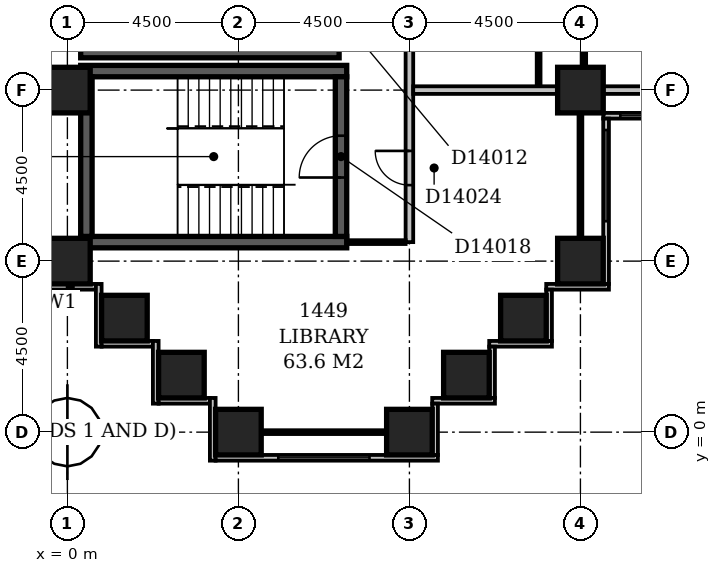
"""IFC4 building model, lengths in metres.
Left out: names, types, materials, properties, quantities, classifications, styles, units other than length and angle.
Written with IfcOpenShell. Run it as: python <this file> out.ifc"""

import sys

from ifc_helpers import new_model, si_unit, direction, frame, frame_2d, origin, origin_2d, place, context, subcontext, project, spatial, rectangle, extrude, element, fill, save


model = new_model("IFC4")
c1 = context("Model", 3, precision=1e-05, world=origin(), true_north=direction((0.0, 1.0)))
c2 = subcontext(c1, "Body", "Model", "MODEL_VIEW")
j1 = project(units=[si_unit("LENGTHUNIT", "METRE"), si_unit("PLANEANGLEUNIT", "RADIAN")], contexts=[c1])
p1 = place(None, origin())
s1 = spatial("IfcSite", under=j1, at=p1, CompositionType="ELEMENT")
p2 = place(p1, origin())
s2 = spatial("IfcBuilding", under=s1, at=p2, CompositionType="ELEMENT")
p3 = place(p2, frame((0.0, 0.0, 61.4)))
s3 = spatial("IfcBuildingStorey", under=s2, at=p3, CompositionType="ELEMENT", Elevation=61.4)
for number, where, z_axis, x_axis in (
    (1, (0.35, 5.0, -0.3), (0.0, 0.0, 1.0), (1.0, 0.0, 0.0)),
    (2, (0.35, 9.5, -0.3), (0.0, 0.0, 1.0), (1.0, 0.0, 0.0)),
):
    element("IfcWall", number, at=place(p3, frame(where, z_axis=z_axis, x_axis=x_axis)), inside=s3, PredefinedType="SHEAR", context=c2, shape_type="SweptSolid", body=[
        extrude(rectangle(XDim=7.0, YDim=0.3, at=frame_2d((3.5, 0.0))), origin(), (0.0, 0.0, 1.0), 3.6),
    ])
p4 = place(p3, frame((0.35, 10.0, -0.3), z_axis=(0.0, 0.0, 1.0), x_axis=(1.0, 0.0, 0.0)))
e3 = element("IfcWall", 3, at=p4, inside=s3, PredefinedType="SHEAR", context=c2, shape_type="SweptSolid", body=[
    extrude(rectangle(XDim=6.8, YDim=0.3, at=frame_2d((3.4, 0.0))), origin(), (0.0, 0.0, 1.0), 3.6),
])
p5 = place(p3, frame((0.5, 5.15, -0.3), z_axis=(0.0, 0.0, 1.0), x_axis=(0.0, 1.0, 0.0)))
e4 = element("IfcWall", 4, at=p5, inside=s3, PredefinedType="SHEAR", context=c2, shape_type="SweptSolid", body=[
    extrude(rectangle(XDim=4.2, YDim=0.3, at=frame_2d((2.1, 0.0))), origin(), (0.0, 0.0, 1.0), 3.6),
])
p6 = place(p3, frame((7.2, 5.15, -0.3), z_axis=(0.0, 0.0, 1.0), x_axis=(0.0, 1.0, 0.0)))
e5 = element("IfcWall", 5, at=p6, inside=s3, PredefinedType="SHEAR", context=c2, shape_type="SweptSolid", body=[
    extrude(rectangle(XDim=4.2, YDim=0.3, at=frame_2d((2.1, 0.0))), origin(), (0.0, 0.0, 1.0), 3.6),
])
p7 = place(p6, frame((1.55, 0.0, 0.3)))
e6 = element("IfcOpeningElement", 6, at=p7, cuts=e5, PredefinedType="OPENING", context=c2, shape_type="SweptSolid", body=[
    extrude(rectangle(XDim=1.1, YDim=2.1, at=frame_2d((0.55, 1.05))), frame((0.0, 0.162, 0.0), z_axis=(0.0, -1.0, 0.0), x_axis=(1.0, 0.0, 0.0)), (0.0, 0.0, 1.0), 0.324),
])
for number, where, z_axis, x_axis in (
    (7, (4.5, 0.0, -0.3), (0.0, 0.0, 1.0), (1.0, 0.0, 0.0)),
    (8, (9.0, 0.0, -0.3), (0.0, 0.0, 1.0), (1.0, 0.0, 0.0)),
    (9, (3.0, 1.5, -0.3), (0.0, 0.0, 1.0), (1.0, 0.0, 0.0)),
    (10, (10.5, 1.5, -0.3), (0.0, 0.0, 1.0), (1.0, 0.0, 0.0)),
    (11, (1.5, 3.0, -0.3), (0.0, 0.0, 1.0), (1.0, 0.0, 0.0)),
    (12, (12.0, 3.0, -0.3), (0.0, 0.0, 1.0), (1.0, 0.0, 0.0)),
    (13, (0.0, 4.5, -0.3), (0.0, 0.0, 1.0), (1.0, 0.0, 0.0)),
    (14, (13.5, 4.5, -0.3), (0.0, 0.0, 1.0), (1.0, 0.0, 0.0)),
    (15, (0.0, 9.0, -0.3), (0.0, 0.0, 1.0), (1.0, 0.0, 0.0)),
    (16, (13.5, 9.0, -0.3), (0.0, 0.0, 1.0), (1.0, 0.0, 0.0)),
):
    element("IfcColumn", number, at=place(p3, frame(where, z_axis=z_axis, x_axis=x_axis)), inside=s3, PredefinedType="COLUMN", context=c2, shape_type="SweptSolid", body=[
        extrude(rectangle(XDim=1.2, YDim=1.2, at=origin_2d()), origin(), (0.0, 0.0, 1.0), 3.6),
    ])
p8 = place(p3, frame((9.675, -0.6, 0.0), z_axis=(0.0, 0.0, 1.0), x_axis=(0.0, 1.0, 0.0)))
e17 = element("IfcWall", 17, at=p8, inside=s3, PredefinedType="STANDARD", context=c2, shape_type="SweptSolid", body=[
    extrude(rectangle(XDim=1.35, YDim=0.15, at=frame_2d((0.675, 0.0))), origin(), (0.0, 0.0, 1.0), 2.7),
])
p9 = place(p3, frame((9.6, 0.825, 0.0), z_axis=(0.0, 0.0, 1.0), x_axis=(1.0, 0.0, 0.0)))
e18 = element("IfcWall", 18, at=p9, inside=s3, PredefinedType="STANDARD", context=c2, shape_type="SweptSolid", body=[
    extrude(rectangle(XDim=1.65, YDim=0.15, at=frame_2d((0.825, 0.0))), origin(), (0.0, 0.0, 1.0), 2.7),
])
p10 = place(p3, frame((11.175, 0.9, 0.0), z_axis=(0.0, 0.0, 1.0), x_axis=(0.0, 1.0, 0.0)))
e19 = element("IfcWall", 19, at=p10, inside=s3, PredefinedType="STANDARD", context=c2, shape_type="SweptSolid", body=[
    extrude(rectangle(XDim=1.35, YDim=0.15, at=frame_2d((0.675, 0.0))), origin(), (0.0, 0.0, 1.0), 2.7),
])
p11 = place(p3, frame((11.1, 2.325, 0.0), z_axis=(0.0, 0.0, 1.0), x_axis=(1.0, 0.0, 0.0)))
e20 = element("IfcWall", 20, at=p11, inside=s3, PredefinedType="STANDARD", context=c2, shape_type="SweptSolid", body=[
    extrude(rectangle(XDim=1.65, YDim=0.15, at=frame_2d((0.825, 0.0))), origin(), (0.0, 0.0, 1.0), 2.7),
])
p12 = place(p3, frame((12.675, 2.4, 0.0), z_axis=(0.0, 0.0, 1.0), x_axis=(0.0, 1.0, 0.0)))
e21 = element("IfcWall", 21, at=p12, inside=s3, PredefinedType="STANDARD", context=c2, shape_type="SweptSolid", body=[
    extrude(rectangle(XDim=1.35, YDim=0.15, at=frame_2d((0.675, 0.0))), origin(), (0.0, 0.0, 1.0), 2.7),
])
p13 = place(p3, frame((12.6, 3.825, 0.0), z_axis=(0.0, 0.0, 1.0), x_axis=(1.0, 0.0, 0.0)))
e22 = element("IfcWall", 22, at=p13, inside=s3, PredefinedType="STANDARD", context=c2, shape_type="SweptSolid", body=[
    extrude(rectangle(XDim=1.65, YDim=0.15, at=frame_2d((0.825, 0.0))), origin(), (0.0, 0.0, 1.0), 2.7),
])
p14 = place(p3, frame((14.175, 3.9, 0.0), z_axis=(0.0, 0.0, 1.0), x_axis=(0.0, 1.0, 0.0)))
e23 = element("IfcWall", 23, at=p14, inside=s3, PredefinedType="STANDARD", context=c2, shape_type="SweptSolid", body=[
    extrude(rectangle(XDim=4.35, YDim=0.15, at=frame_2d((2.175, 0.0))), origin(), (0.0, 0.0, 1.0), 2.7),
])
p15 = place(p14, frame((1.65, 0.0, 0.6)))
e24 = element("IfcOpeningElement", 24, at=p15, cuts=e23, PredefinedType="OPENING", context=c2, shape_type="SweptSolid", body=[
    extrude(rectangle(XDim=2.4, YDim=1.8, at=frame_2d((1.2, 0.9))), frame((0.0, 0.087, 0.0), z_axis=(0.0, -1.0, 0.0), x_axis=(1.0, 0.0, 0.0)), (0.0, 0.0, 1.0), 0.174),
])
p16 = place(p3, frame((14.1, 8.325, 0.0), z_axis=(0.0, 0.0, 1.0), x_axis=(1.0, 0.0, 0.0)))
e25 = element("IfcWall", 25, at=p16, inside=s3, PredefinedType="STANDARD", context=c2, shape_type="SweptSolid", body=[
    extrude(rectangle(XDim=4.65, YDim=0.15, at=frame_2d((2.325, 0.0))), origin(), (0.0, 0.0, 1.0), 2.7),
])
p17 = place(p16, frame((0.45, 0.0, 0.6)))
e26 = element("IfcOpeningElement", 26, at=p17, cuts=e25, PredefinedType="OPENING", context=c2, shape_type="SweptSolid", body=[
    extrude(rectangle(XDim=2.4, YDim=1.8, at=frame_2d((1.2, 0.9))), frame((0.0, 0.087, 0.0), z_axis=(0.0, -1.0, 0.0), x_axis=(1.0, 0.0, 0.0)), (0.0, 0.0, 1.0), 0.174),
])
p18 = place(p3, frame((-0.6, 3.825, 0.0), z_axis=(0.0, 0.0, 1.0), x_axis=(1.0, 0.0, 0.0)))
e27 = element("IfcWall", 27, at=p18, inside=s3, PredefinedType="STANDARD", context=c2, shape_type="SweptSolid", body=[
    extrude(rectangle(XDim=1.35, YDim=0.15, at=frame_2d((0.675, 0.0))), origin(), (0.0, 0.0, 1.0), 2.7),
])
p19 = place(p3, frame((0.825, 3.9, 0.0), z_axis=(0.0, 0.0, 1.0), x_axis=(0.0, -1.0, 0.0)))
e28 = element("IfcWall", 28, at=p19, inside=s3, PredefinedType="STANDARD", context=c2, shape_type="SweptSolid", body=[
    extrude(rectangle(XDim=1.65, YDim=0.15, at=frame_2d((0.825, 0.0))), origin(), (0.0, 0.0, 1.0), 2.7),
])
p20 = place(p3, frame((0.9, 2.325, 0.0), z_axis=(0.0, 0.0, 1.0), x_axis=(1.0, 0.0, 0.0)))
e29 = element("IfcWall", 29, at=p20, inside=s3, PredefinedType="STANDARD", context=c2, shape_type="SweptSolid", body=[
    extrude(rectangle(XDim=1.35, YDim=0.15, at=frame_2d((0.675, 0.0))), origin(), (0.0, 0.0, 1.0), 2.7),
])
p21 = place(p3, frame((2.325, 2.4, 0.0), z_axis=(0.0, 0.0, 1.0), x_axis=(0.0, -1.0, 0.0)))
e30 = element("IfcWall", 30, at=p21, inside=s3, PredefinedType="STANDARD", context=c2, shape_type="SweptSolid", body=[
    extrude(rectangle(XDim=1.65, YDim=0.15, at=frame_2d((0.825, 0.0))), origin(), (0.0, 0.0, 1.0), 2.7),
])
p22 = place(p3, frame((2.4, 0.825, 0.0), z_axis=(0.0, 0.0, 1.0), x_axis=(1.0, 0.0, 0.0)))
e31 = element("IfcWall", 31, at=p22, inside=s3, PredefinedType="STANDARD", context=c2, shape_type="SweptSolid", body=[
    extrude(rectangle(XDim=1.35, YDim=0.15, at=frame_2d((0.675, 0.0))), origin(), (0.0, 0.0, 1.0), 2.7),
])
p23 = place(p3, frame((3.825, 0.9, 0.0), z_axis=(0.0, 0.0, 1.0), x_axis=(0.0, -1.0, 0.0)))
e32 = element("IfcWall", 32, at=p23, inside=s3, PredefinedType="STANDARD", context=c2, shape_type="SweptSolid", body=[
    extrude(rectangle(XDim=1.65, YDim=0.15, at=frame_2d((0.825, 0.0))), origin(), (0.0, 0.0, 1.0), 2.7),
])
p24 = place(p3, frame((3.9, -0.675, 0.0), z_axis=(0.0, 0.0, 1.0), x_axis=(1.0, 0.0, 0.0)))
e33 = element("IfcWall", 33, at=p24, inside=s3, PredefinedType="STANDARD", context=c2, shape_type="SweptSolid", body=[
    extrude(rectangle(XDim=5.85, YDim=0.15, at=frame_2d((2.925, 0.0))), origin(), (0.0, 0.0, 1.0), 2.7),
])
p25 = place(p24, frame((1.65, 0.0, 0.6)))
e34 = element("IfcOpeningElement", 34, at=p25, cuts=e33, PredefinedType="OPENING", context=c2, shape_type="SweptSolid", body=[
    extrude(rectangle(XDim=2.4, YDim=1.8, at=frame_2d((1.2, 0.9))), frame((0.0, 0.087, 0.0), z_axis=(0.0, -1.0, 0.0), x_axis=(1.0, 0.0, 0.0)), (0.0, 0.0, 1.0), 0.174),
])
p26 = place(p3, frame((5.1, 0.0, 0.0), z_axis=(0.0, 0.0, 1.0), x_axis=(1.0, 0.0, 0.0)))
e35 = element("IfcWall", 35, at=p26, inside=s3, PredefinedType="PARTITIONING", context=c2, shape_type="SweptSolid", body=[
    extrude(rectangle(XDim=3.3, YDim=0.1, at=frame_2d((1.65, 0.0))), origin(), (0.0, 0.0, 1.0), 2.7),
])
p27 = place(p3, frame((0.0, 4.4, 0.0), z_axis=(0.0, 0.0, 1.0), x_axis=(0.0, 1.0, 0.0)))
e36 = element("IfcWall", 36, at=p27, inside=s3, PredefinedType="PARTITIONING", context=c2, shape_type="SweptSolid", body=[
    extrude(rectangle(XDim=0.7, YDim=0.1, at=frame_2d((0.35, 0.0))), origin(), (0.0, 0.0, 1.0), 2.7),
])
p28 = place(p3, frame((7.349, 5.0, 0.0), z_axis=(0.0, 0.0, 1.0), x_axis=(1.0, 0.0, 0.0)))
e37 = element("IfcWall", 37, at=p28, inside=s3, PredefinedType="PARTITIONING", context=c2, shape_type="SweptSolid", body=[
    extrude(rectangle(XDim=1.551, YDim=0.1, at=frame_2d((0.775, 0.0))), origin(), (0.0, 0.0, 1.0), 3.3),
])
p29 = place(p3, frame((9.0, 5.0, 0.0), z_axis=(0.0, 0.0, 1.0), x_axis=(0.0, 1.0, 0.0)))
e38 = element("IfcWall", 38, at=p29, inside=s3, PredefinedType="PARTITIONING", context=c2, shape_type="SweptSolid", body=[
    extrude(rectangle(XDim=44.5, YDim=0.2, at=frame_2d((22.25, 0.0))), origin(), (0.0, 0.0, 1.0), 3.3),
])
p30 = place(p29, frame((28.05, 0.0, 0.0)))
e39 = element("IfcOpeningElement", 39, at=p30, cuts=e38, PredefinedType="OPENING", context=c2, shape_type="SweptSolid", body=[
    extrude(rectangle(XDim=1.0, YDim=2.1, at=frame_2d((0.5, 1.05))), frame((0.0, 0.112, 0.0), z_axis=(0.0, -1.0, 0.0), x_axis=(1.0, 0.0, 0.0)), (0.0, 0.0, 1.0), 0.224),
])
p31 = place(p29, frame((23.95, 0.0, 0.0)))
e40 = element("IfcOpeningElement", 40, at=p31, cuts=e38, PredefinedType="OPENING", context=c2, shape_type="SweptSolid", body=[
    extrude(rectangle(XDim=1.0, YDim=2.1, at=frame_2d((0.5, 1.05))), frame((0.0, 0.112, 0.0), z_axis=(0.0, -1.0, 0.0), x_axis=(1.0, 0.0, 0.0)), (0.0, 0.0, 1.0), 0.224),
])
p32 = place(p29, frame((18.3, 0.0, 0.0)))
e41 = element("IfcOpeningElement", 41, at=p32, cuts=e38, PredefinedType="OPENING", context=c2, shape_type="SweptSolid", body=[
    extrude(rectangle(XDim=1.0, YDim=2.1, at=frame_2d((0.5, 1.05))), frame((0.0, 0.112, 0.0), z_axis=(0.0, -1.0, 0.0), x_axis=(1.0, 0.0, 0.0)), (0.0, 0.0, 1.0), 0.224),
])
p33 = place(p29, frame((9.3, 0.0, 0.0)))
e42 = element("IfcOpeningElement", 42, at=p33, cuts=e38, PredefinedType="OPENING", context=c2, shape_type="SweptSolid", body=[
    extrude(rectangle(XDim=1.0, YDim=2.1, at=frame_2d((0.5, 1.05))), frame((0.0, 0.112, 0.0), z_axis=(0.0, -1.0, 0.0), x_axis=(1.0, 0.0, 0.0)), (0.0, 0.0, 1.0), 0.224),
])
p34 = place(p29, frame((32.75, 0.0, 0.0)))
e43 = element("IfcOpeningElement", 43, at=p34, cuts=e38, PredefinedType="OPENING", context=c2, shape_type="SweptSolid", body=[
    extrude(rectangle(XDim=0.9, YDim=2.1, at=frame_2d((0.45, 1.05))), frame((0.0, 0.112, 0.0), z_axis=(0.0, -1.0, 0.0), x_axis=(1.0, 0.0, 0.0)), (0.0, 0.0, 1.0), 0.224),
])
p35 = place(p29, frame((1.5, 0.0, 0.0)))
e44 = element("IfcOpeningElement", 44, at=p35, cuts=e38, PredefinedType="OPENING", context=c2, shape_type="SweptSolid", body=[
    extrude(rectangle(XDim=0.9, YDim=2.1, at=frame_2d((0.45, 1.05))), frame((0.0, 0.112, 0.0), z_axis=(0.0, -1.0, 0.0), x_axis=(1.0, 0.0, 0.0)), (0.0, 0.0, 1.0), 0.224),
])
p36 = place(p3, frame((13.5, 5.1, 0.0), z_axis=(0.0, 0.0, 1.0), x_axis=(0.0, 1.0, 0.0)))
e45 = element("IfcWall", 45, at=p36, inside=s3, PredefinedType="PARTITIONING", context=c2, shape_type="SweptSolid", body=[
    extrude(rectangle(XDim=3.3, YDim=0.1, at=frame_2d((1.65, 0.0))), origin(), (0.0, 0.0, 1.0), 2.7),
])
p37 = place(p3, frame((9.1, 9.0, 0.0), z_axis=(0.0, 0.0, 1.0), x_axis=(1.0, 0.0, 0.0)))
e46 = element("IfcWall", 46, at=p37, inside=s3, PredefinedType="PARTITIONING", context=c2, shape_type="SweptSolid", body=[
    extrude(rectangle(XDim=3.8, YDim=0.2, at=frame_2d((1.9, 0.0))), origin(), (0.0, 0.0, 1.0), 3.3),
])
p38 = place(p3, frame((14.1, 9.0, 0.0), z_axis=(0.0, 0.0, 1.0), x_axis=(1.0, 0.0, 0.0)))
e47 = element("IfcWall", 47, at=p38, inside=s3, PredefinedType="PARTITIONING", context=c2, shape_type="SweptSolid", body=[
    extrude(rectangle(XDim=3.3, YDim=0.2, at=frame_2d((1.65, 0.0))), origin(), (0.0, 0.0, 1.0), 2.7),
])
p39 = place(p3, frame((12.4, 9.1, 0.0), z_axis=(0.0, 0.0, 1.0), x_axis=(0.0, 1.0, 0.0)))
e48 = element("IfcWall", 48, at=p39, inside=s3, PredefinedType="PARTITIONING", context=c2, shape_type="SweptSolid", body=[
    extrude(rectangle(XDim=4.9, YDim=0.1, at=frame_2d((2.45, 0.0))), origin(), (0.0, 0.0, 1.0), 3.3),
])
p40 = place(p39, frame((1.95, 0.0, 0.0)))
e49 = element("IfcOpeningElement", 49, at=p40, cuts=e48, PredefinedType="OPENING", context=c2, shape_type="SweptSolid", body=[
    extrude(rectangle(XDim=0.9, YDim=2.1, at=frame_2d((0.45, 1.05))), frame((0.0, 0.062, 0.0), z_axis=(0.0, -1.0, 0.0), x_axis=(1.0, 0.0, 0.0)), (0.0, 0.0, 1.0), 0.124),
])
p41 = place(p3, frame((13.6, 9.6, 0.0), z_axis=(0.0, 0.0, 1.0), x_axis=(0.0, 1.0, 0.0)))
e50 = element("IfcWall", 50, at=p41, inside=s3, PredefinedType="PARTITIONING", context=c2, shape_type="SweptSolid", body=[
    extrude(rectangle(XDim=8.3, YDim=0.1, at=frame_2d((4.15, 0.0))), origin(), (0.0, 0.0, 1.0), 3.3),
])
p42 = place(p41, frame((1.2, 0.0, 0.0)))
e51 = element("IfcOpeningElement", 51, at=p42, cuts=e50, PredefinedType="OPENING", context=c2, shape_type="SweptSolid", body=[
    extrude(rectangle(XDim=0.9, YDim=2.1, at=frame_2d((0.45, 1.05))), frame((0.0, 0.062, 0.0), z_axis=(0.0, -1.0, 0.0), x_axis=(1.0, 0.0, 0.0)), (0.0, 0.0, 1.0), 0.124),
])
p43 = place(p41, frame((5.7, 0.0, 0.0)))
e52 = element("IfcOpeningElement", 52, at=p43, cuts=e50, PredefinedType="OPENING", context=c2, shape_type="SweptSolid", body=[
    extrude(rectangle(XDim=0.9, YDim=2.1, at=frame_2d((0.45, 1.05))), frame((0.0, 0.062, 0.0), z_axis=(0.0, -1.0, 0.0), x_axis=(1.0, 0.0, 0.0)), (0.0, 0.0, 1.0), 0.124),
])
p44 = place(p15, origin())
e53 = element("IfcWindow", 53, at=p44, inside=s3, PartitioningType="SINGLE_PANEL", PredefinedType="WINDOW", context=c2, shape_type="SweptSolid", body=[
    extrude(rectangle(XDim=2.4, YDim=1.8, at=frame_2d((1.2, 0.9))), frame((0.0, 0.03, 0.0), z_axis=(0.0, -1.0, 0.0), x_axis=(1.0, 0.0, 0.0)), (0.0, 0.0, 1.0), 0.06),
])
fill(e24, e53)
p45 = place(p17, origin())
e54 = element("IfcWindow", 54, at=p45, inside=s3, PartitioningType="SINGLE_PANEL", PredefinedType="WINDOW", context=c2, shape_type="SweptSolid", body=[
    extrude(rectangle(XDim=2.4, YDim=1.8, at=frame_2d((1.2, 0.9))), frame((0.0, 0.03, 0.0), z_axis=(0.0, -1.0, 0.0), x_axis=(1.0, 0.0, 0.0)), (0.0, 0.0, 1.0), 0.06),
])
fill(e26, e54)
p46 = place(p25, origin())
e55 = element("IfcWindow", 55, at=p46, inside=s3, PartitioningType="SINGLE_PANEL", PredefinedType="WINDOW", context=c2, shape_type="SweptSolid", body=[
    extrude(rectangle(XDim=2.4, YDim=1.8, at=frame_2d((1.2, 0.9))), frame((0.0, 0.03, 0.0), z_axis=(0.0, -1.0, 0.0), x_axis=(1.0, 0.0, 0.0)), (0.0, 0.0, 1.0), 0.06),
])
fill(e34, e55)
p47 = place(p7, origin())
e56 = element("IfcDoor", 56, at=p47, inside=s3, OperationType="SINGLE_SWING_LEFT", PredefinedType="DOOR", context=c2, shape_type="SweptSolid", body=[
    extrude(rectangle(XDim=1.1, YDim=2.1, at=frame_2d((0.55, 1.05))), frame((0.0, 0.025, 0.0), z_axis=(0.0, -1.0, 0.0), x_axis=(1.0, 0.0, 0.0)), (0.0, 0.0, 1.0), 0.05),
])
fill(e6, e56)
p48 = place(p35, frame((0.9, 0.0, 0.0), z_axis=(0.0, 0.0, 1.0), x_axis=(-1.0, 0.0, 0.0)))
e57 = element("IfcDoor", 57, at=p48, inside=s3, OperationType="SINGLE_SWING_LEFT", PredefinedType="DOOR", context=c2, shape_type="SweptSolid", body=[
    extrude(rectangle(XDim=0.9, YDim=2.1, at=frame_2d((0.45, 1.05))), frame((0.0, 0.025, 0.0), z_axis=(0.0, -1.0, 0.0), x_axis=(1.0, 0.0, 0.0)), (0.0, 0.0, 1.0), 0.05),
])
fill(e44, e57)
save(model, sys.argv[1])
